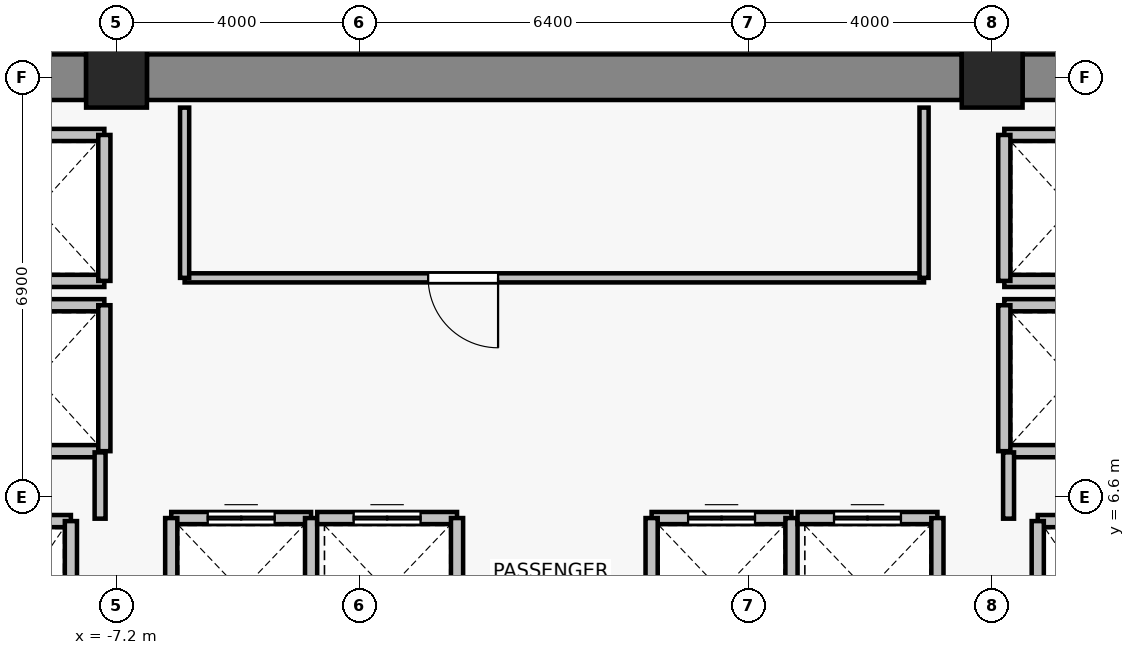
"""IFC4 building model, lengths in metres.
Left out: names, types, materials, properties, quantities, classifications, styles, units other than length and angle.
Written with IfcOpenShell. Run it as: python <this file> out.ifc"""

import sys

from ifc_helpers import new_model, si_unit, direction, frame, frame_2d, origin, origin_2d, place, context, subcontext, project, spatial, rectangle, extrude, source, transform, mapped, element, fill, save


model = new_model("IFC4")
c1 = context("Model", 3, precision=1e-05, world=origin(), true_north=direction((0.0, 1.0)))
c2 = subcontext(c1, "Body", "Model", "MODEL_VIEW")
j1 = project(units=[si_unit("LENGTHUNIT", "METRE"), si_unit("PLANEANGLEUNIT", "RADIAN")], contexts=[c1])
p1 = place(None, origin())
s1 = spatial("IfcSite", under=j1, at=p1, CompositionType="ELEMENT")
p2 = place(p1, origin())
s2 = spatial("IfcBuilding", under=s1, at=p2, CompositionType="ELEMENT")
p3 = place(p2, frame((0.0, 0.0, 182.5)))
s3 = spatial("IfcBuildingStorey", under=s2, at=p3, CompositionType="ELEMENT", Elevation=182.5)
for number, where, z_axis, x_axis in (
    (1, (-7.2, 13.5, 0.0), (0.0, 0.0, 1.0), (1.0, 0.0, 0.0)),
    (2, (7.2, 13.5, 0.0), (0.0, 0.0, 1.0), (1.0, 0.0, 0.0)),
):
    element("IfcColumn", number, at=place(p3, frame(where, z_axis=z_axis, x_axis=x_axis)), inside=s3, PredefinedType="COLUMN", context=c2, shape_type="SweptSolid", body=[
        extrude(rectangle(XDim=1.0, YDim=1.0, at=origin_2d()), origin(), (0.0, 0.0, 1.0), 3.3),
    ])
p4 = place(p3, frame((-13.9, 13.5, 0.0), z_axis=(0.0, 0.0, 1.0), x_axis=(1.0, 0.0, 0.0)))
e3 = element("IfcWall", 3, at=p4, inside=s3, PredefinedType="SHEAR", context=c2, shape_type="SweptSolid", body=[
    extrude(rectangle(XDim=6.2, YDim=0.75, at=frame_2d((3.1, 0.0))), origin(), (0.0, 0.0, 1.0), 3.075),
])
p5 = place(p3, frame((-6.7, 13.5, 0.0), z_axis=(0.0, 0.0, 1.0), x_axis=(1.0, 0.0, 0.0)))
e4 = element("IfcWall", 4, at=p5, inside=s3, PredefinedType="SHEAR", context=c2, shape_type="SweptSolid", body=[
    extrude(rectangle(XDim=13.4, YDim=0.75, at=frame_2d((6.7, 0.0))), origin(), (0.0, 0.0, 1.0), 3.075),
])
p6 = place(p3, frame((7.7, 13.5, 0.0), z_axis=(0.0, 0.0, 1.0), x_axis=(1.0, 0.0, 0.0)))
e5 = element("IfcWall", 5, at=p6, inside=s3, PredefinedType="SHEAR", context=c2, shape_type="SweptSolid", body=[
    extrude(rectangle(XDim=6.2, YDim=0.75, at=frame_2d((3.1, 0.0))), origin(), (0.0, 0.0, 1.0), 3.075),
])
p7 = place(p3, frame((-9.95, 6.2, 0.0), z_axis=(0.0, 0.0, 1.0), x_axis=(1.0, 0.0, 0.0)))
e6 = element("IfcWall", 6, at=p7, inside=s3, PredefinedType="SOLIDWALL", context=c2, shape_type="SweptSolid", body=[
    extrude(rectangle(XDim=2.0, YDim=0.2, at=frame_2d((1.0, 0.0))), origin(), (0.0, 0.0, 1.0), 3.075),
])
p8 = place(p3, frame((-7.95, 6.2, 0.0), z_axis=(0.0, 0.0, 1.0), x_axis=(0.0, -1.0, 0.0)))
e7 = element("IfcWall", 7, at=p8, inside=s3, PredefinedType="SOLIDWALL", context=c2, shape_type="SweptSolid", body=[
    extrude(rectangle(XDim=2.8, YDim=0.2, at=frame_2d((1.4, 0.0))), origin(), (0.0, 0.0, 1.0), 3.075),
])
p9 = place(p3, frame((7.95, 6.2, 0.0), z_axis=(0.0, 0.0, 1.0), x_axis=(1.0, 0.0, 0.0)))
e8 = element("IfcWall", 8, at=p9, inside=s3, PredefinedType="SOLIDWALL", context=c2, shape_type="SweptSolid", body=[
    extrude(rectangle(XDim=2.0, YDim=0.2, at=frame_2d((1.0, 0.0))), origin(), (0.0, 0.0, 1.0), 3.075),
])
p10 = place(p3, frame((7.95, 3.4, 0.0), z_axis=(0.0, 0.0, 1.0), x_axis=(0.0, 1.0, 0.0)))
e9 = element("IfcWall", 9, at=p10, inside=s3, PredefinedType="SOLIDWALL", context=c2, shape_type="SweptSolid", body=[
    extrude(rectangle(XDim=2.8, YDim=0.2, at=frame_2d((1.4, 0.0))), origin(), (0.0, 0.0, 1.0), 3.075),
])
p11 = place(p3, frame((-6.3, 6.25, 0.0), z_axis=(0.0, 0.0, 1.0), x_axis=(1.0, 0.0, 0.0)))
e10 = element("IfcWall", 10, at=p11, inside=s3, PredefinedType="SOLIDWALL", context=c2, shape_type="SweptSolid", body=[
    extrude(rectangle(XDim=2.3, YDim=0.2, at=frame_2d((1.15, 0.0))), origin(), (0.0, 0.0, 1.0), 3.075),
])
p12 = place(p11, frame((0.6, 0.0, 0.0)))
e11 = element("IfcOpeningElement", 11, at=p12, cuts=e10, PredefinedType="OPENING", context=c2, shape_type="SweptSolid", body=[
    extrude(rectangle(XDim=1.1, YDim=2.2, at=frame_2d((0.55, 1.1))), frame((0.0, 0.11, 0.0), z_axis=(0.0, -1.0, 0.0), x_axis=(1.0, 0.0, 0.0)), (0.0, 0.0, 1.0), 0.22),
])
for number, where, z_axis, x_axis in (
    (12, (-6.3, 3.85, 0.0), (0.0, 0.0, 1.0), (0.0, 1.0, 0.0)),
    (13, (-4.0, 6.25, 0.0), (0.0, 0.0, 1.0), (0.0, -1.0, 0.0)),
):
    element("IfcWall", number, at=place(p3, frame(where, z_axis=z_axis, x_axis=x_axis)), inside=s3, PredefinedType="SOLIDWALL", context=c2, shape_type="SweptSolid", body=[
        extrude(rectangle(XDim=2.4, YDim=0.2, at=frame_2d((1.2, 0.0))), origin(), (0.0, 0.0, 1.0), 3.075),
    ])
p13 = place(p3, frame((-3.9, 6.25, 0.0), z_axis=(0.0, 0.0, 1.0), x_axis=(1.0, 0.0, 0.0)))
e14 = element("IfcWall", 14, at=p13, inside=s3, PredefinedType="SOLIDWALL", context=c2, shape_type="SweptSolid", body=[
    extrude(rectangle(XDim=2.3, YDim=0.2, at=frame_2d((1.15, 0.0))), origin(), (0.0, 0.0, 1.0), 3.075),
])
p14 = place(p13, frame((0.6, 0.0, 0.0)))
e15 = element("IfcOpeningElement", 15, at=p14, cuts=e14, PredefinedType="OPENING", context=c2, shape_type="SweptSolid", body=[
    extrude(rectangle(XDim=1.1, YDim=2.2, at=frame_2d((0.55, 1.1))), frame((0.0, 0.11, 0.0), z_axis=(0.0, -1.0, 0.0), x_axis=(1.0, 0.0, 0.0)), (0.0, 0.0, 1.0), 0.22),
])
p15 = place(p3, frame((-1.6, 6.25, 0.0), z_axis=(0.0, 0.0, 1.0), x_axis=(0.0, -1.0, 0.0)))
e16 = element("IfcWall", 16, at=p15, inside=s3, PredefinedType="SOLIDWALL", context=c2, shape_type="SweptSolid", body=[
    extrude(rectangle(XDim=2.4, YDim=0.2, at=frame_2d((1.2, 0.0))), origin(), (0.0, 0.0, 1.0), 3.075),
])
p16 = place(p3, frame((1.6, 6.25, 0.0), z_axis=(0.0, 0.0, 1.0), x_axis=(1.0, 0.0, 0.0)))
e17 = element("IfcWall", 17, at=p16, inside=s3, PredefinedType="SOLIDWALL", context=c2, shape_type="SweptSolid", body=[
    extrude(rectangle(XDim=2.3, YDim=0.2, at=frame_2d((1.15, 0.0))), origin(), (0.0, 0.0, 1.0), 3.075),
])
p17 = place(p16, frame((0.6, 0.0, 0.0)))
e18 = element("IfcOpeningElement", 18, at=p17, cuts=e17, PredefinedType="OPENING", context=c2, shape_type="SweptSolid", body=[
    extrude(rectangle(XDim=1.1, YDim=2.2, at=frame_2d((0.55, 1.1))), frame((0.0, 0.11, 0.0), z_axis=(0.0, -1.0, 0.0), x_axis=(1.0, 0.0, 0.0)), (0.0, 0.0, 1.0), 0.22),
])
for number, where, z_axis, x_axis in (
    (19, (1.6, 3.85, 0.0), (0.0, 0.0, 1.0), (0.0, 1.0, 0.0)),
    (20, (3.9, 6.25, 0.0), (0.0, 0.0, 1.0), (0.0, -1.0, 0.0)),
):
    element("IfcWall", number, at=place(p3, frame(where, z_axis=z_axis, x_axis=x_axis)), inside=s3, PredefinedType="SOLIDWALL", context=c2, shape_type="SweptSolid", body=[
        extrude(rectangle(XDim=2.4, YDim=0.2, at=frame_2d((1.2, 0.0))), origin(), (0.0, 0.0, 1.0), 3.075),
    ])
p18 = place(p3, frame((4.0, 6.25, 0.0), z_axis=(0.0, 0.0, 1.0), x_axis=(1.0, 0.0, 0.0)))
e21 = element("IfcWall", 21, at=p18, inside=s3, PredefinedType="SOLIDWALL", context=c2, shape_type="SweptSolid", body=[
    extrude(rectangle(XDim=2.3, YDim=0.2, at=frame_2d((1.15, 0.0))), origin(), (0.0, 0.0, 1.0), 3.075),
])
p19 = place(p18, frame((0.6, 0.0, 0.0)))
e22 = element("IfcOpeningElement", 22, at=p19, cuts=e21, PredefinedType="OPENING", context=c2, shape_type="SweptSolid", body=[
    extrude(rectangle(XDim=1.1, YDim=2.2, at=frame_2d((0.55, 1.1))), frame((0.0, 0.11, 0.0), z_axis=(0.0, -1.0, 0.0), x_axis=(1.0, 0.0, 0.0)), (0.0, 0.0, 1.0), 0.22),
])
p20 = place(p3, frame((6.3, 6.25, 0.0), z_axis=(0.0, 0.0, 1.0), x_axis=(0.0, -1.0, 0.0)))
e23 = element("IfcWall", 23, at=p20, inside=s3, PredefinedType="SOLIDWALL", context=c2, shape_type="SweptSolid", body=[
    extrude(rectangle(XDim=2.4, YDim=0.2, at=frame_2d((1.2, 0.0))), origin(), (0.0, 0.0, 1.0), 3.075),
])
for number, where, z_axis, x_axis in (
    (24, (-7.4, 7.35, 0.0), (0.0, 0.0, 1.0), (-1.0, 0.0, 0.0)),
    (25, (-9.6, 9.75, 0.0), (0.0, 0.0, 1.0), (1.0, 0.0, 0.0)),
):
    element("IfcWall", number, at=place(p3, frame(where, z_axis=z_axis, x_axis=x_axis)), inside=s3, PredefinedType="SOLIDWALL", context=c2, shape_type="SweptSolid", body=[
        extrude(rectangle(XDim=2.2, YDim=0.2, at=frame_2d((1.1, 0.0))), origin(), (0.0, 0.0, 1.0), 2.565),
    ])
p21 = place(p3, frame((-7.4, 9.75, 0.0), z_axis=(0.0, 0.0, 1.0), x_axis=(0.0, -1.0, 0.0)))
e26 = element("IfcWall", 26, at=p21, inside=s3, PredefinedType="SOLIDWALL", context=c2, shape_type="SweptSolid", body=[
    extrude(rectangle(XDim=2.4, YDim=0.2, at=frame_2d((1.2, 0.0))), origin(), (0.0, 0.0, 1.0), 2.565),
])
for number, where, z_axis, x_axis in (
    (27, (-7.4, 10.15, 0.0), (0.0, 0.0, 1.0), (-1.0, 0.0, 0.0)),
    (28, (-9.6, 12.55, 0.0), (0.0, 0.0, 1.0), (1.0, 0.0, 0.0)),
):
    element("IfcWall", number, at=place(p3, frame(where, z_axis=z_axis, x_axis=x_axis)), inside=s3, PredefinedType="SOLIDWALL", context=c2, shape_type="SweptSolid", body=[
        extrude(rectangle(XDim=2.2, YDim=0.2, at=frame_2d((1.1, 0.0))), origin(), (0.0, 0.0, 1.0), 2.565),
    ])
p22 = place(p3, frame((-7.4, 12.55, 0.0), z_axis=(0.0, 0.0, 1.0), x_axis=(0.0, -1.0, 0.0)))
e29 = element("IfcWall", 29, at=p22, inside=s3, PredefinedType="SOLIDWALL", context=c2, shape_type="SweptSolid", body=[
    extrude(rectangle(XDim=2.4, YDim=0.2, at=frame_2d((1.2, 0.0))), origin(), (0.0, 0.0, 1.0), 2.565),
])
for number, where, z_axis, x_axis in (
    (30, (9.6, 7.35, 0.0), (0.0, 0.0, 1.0), (-1.0, 0.0, 0.0)),
    (31, (7.4, 9.75, 0.0), (0.0, 0.0, 1.0), (1.0, 0.0, 0.0)),
):
    element("IfcWall", number, at=place(p3, frame(where, z_axis=z_axis, x_axis=x_axis)), inside=s3, PredefinedType="SOLIDWALL", context=c2, shape_type="SweptSolid", body=[
        extrude(rectangle(XDim=2.2, YDim=0.2, at=frame_2d((1.1, 0.0))), origin(), (0.0, 0.0, 1.0), 2.565),
    ])
p23 = place(p3, frame((7.4, 7.35, 0.0), z_axis=(0.0, 0.0, 1.0), x_axis=(0.0, 1.0, 0.0)))
e32 = element("IfcWall", 32, at=p23, inside=s3, PredefinedType="SOLIDWALL", context=c2, shape_type="SweptSolid", body=[
    extrude(rectangle(XDim=2.4, YDim=0.2, at=frame_2d((1.2, 0.0))), origin(), (0.0, 0.0, 1.0), 2.565),
])
for number, where, z_axis, x_axis in (
    (33, (9.6, 10.15, 0.0), (0.0, 0.0, 1.0), (-1.0, 0.0, 0.0)),
    (34, (7.4, 12.55, 0.0), (0.0, 0.0, 1.0), (1.0, 0.0, 0.0)),
):
    element("IfcWall", number, at=place(p3, frame(where, z_axis=z_axis, x_axis=x_axis)), inside=s3, PredefinedType="SOLIDWALL", context=c2, shape_type="SweptSolid", body=[
        extrude(rectangle(XDim=2.2, YDim=0.2, at=frame_2d((1.1, 0.0))), origin(), (0.0, 0.0, 1.0), 2.565),
    ])
p24 = place(p3, frame((7.4, 10.15, 0.0), z_axis=(0.0, 0.0, 1.0), x_axis=(0.0, 1.0, 0.0)))
e35 = element("IfcWall", 35, at=p24, inside=s3, PredefinedType="SOLIDWALL", context=c2, shape_type="SweptSolid", body=[
    extrude(rectangle(XDim=2.4, YDim=0.2, at=frame_2d((1.2, 0.0))), origin(), (0.0, 0.0, 1.0), 2.565),
])
for number, where, z_axis, x_axis in (
    (36, (-7.47, 7.33, 0.0), (0.0, 0.0, 1.0), (0.0, -1.0, 0.0)),
    (37, (7.47, 6.24, 0.0), (0.0, 0.0, 1.0), (0.0, 1.0, 0.0)),
):
    element("IfcWall", number, at=place(p3, frame(where, z_axis=z_axis, x_axis=x_axis)), inside=s3, PredefinedType="PARTITIONING", context=c2, shape_type="SweptSolid", body=[
        extrude(rectangle(XDim=1.09, YDim=0.18, at=frame_2d((0.545, 0.0))), origin(), (0.0, 0.0, 1.0), 2.565),
    ])
p25 = place(p3, frame((6.08, 10.2, 0.0), z_axis=(0.0, 0.0, 1.0), x_axis=(-1.0, 0.0, 0.0)))
e38 = element("IfcWall", 38, at=p25, inside=s3, PredefinedType="PARTITIONING", context=c2, shape_type="SweptSolid", body=[
    extrude(rectangle(XDim=12.16, YDim=0.15, at=frame_2d((6.08, 0.0))), origin(), (0.0, 0.0, 1.0), 3.075),
])
p26 = place(p25, frame((7.005, 0.0, 0.0)))
e39 = element("IfcOpeningElement", 39, at=p26, cuts=e38, PredefinedType="OPENING", context=c2, shape_type="SweptSolid", body=[
    extrude(rectangle(XDim=1.15, YDim=2.15, at=frame_2d((0.575, 1.075))), frame((0.0, 0.085, 0.0), z_axis=(0.0, -1.0, 0.0), x_axis=(1.0, 0.0, 0.0)), (0.0, 0.0, 1.0), 0.17),
])
for number, where, z_axis, x_axis in (
    (40, (-6.08, 10.2, 0.0), (0.0, 0.0, 1.0), (0.0, 1.0, 0.0)),
    (41, (6.08, 13.0, 0.0), (0.0, 0.0, 1.0), (0.0, -1.0, 0.0)),
):
    element("IfcWall", number, at=place(p3, frame(where, z_axis=z_axis, x_axis=x_axis)), inside=s3, PredefinedType="PARTITIONING", context=c2, shape_type="SweptSolid", body=[
        extrude(rectangle(XDim=2.8, YDim=0.15, at=frame_2d((1.4, 0.0))), origin(), (0.0, 0.0, 1.0), 3.075),
    ])
m1 = source(origin(), c2, "Body", "SweptSolid", [
    extrude(rectangle(XDim=1.1, YDim=2.2, at=frame_2d((0.55, 1.1))), frame((0.0, 0.025, 0.0), z_axis=(0.0, -1.0, 0.0), x_axis=(1.0, 0.0, 0.0)), (0.0, 0.0, 1.0), 0.05),
])
p27 = place(p12, origin())
e42 = element("IfcDoor", 42, at=p27, inside=s3, OperationType="DOUBLE_DOOR_SLIDING", PredefinedType="DOOR", context=c2, shape_type="MappedRepresentation", body=[
    mapped(m1, transform((0.0, 0.0, 0.0), x_axis=(1.0, 0.0, 0.0), y_axis=(0.0, 1.0, 0.0), z_axis=(0.0, 0.0, 1.0), scale=1.0)),
])
fill(e11, e42)
p28 = place(p14, origin())
e43 = element("IfcDoor", 43, at=p28, inside=s3, OperationType="DOUBLE_DOOR_SLIDING", PredefinedType="DOOR", context=c2, shape_type="MappedRepresentation", body=[
    mapped(m1, transform((0.0, 0.0, 0.0), x_axis=(1.0, 0.0, 0.0), y_axis=(0.0, 1.0, 0.0), z_axis=(0.0, 0.0, 1.0), scale=1.0)),
])
fill(e15, e43)
p29 = place(p17, origin())
e44 = element("IfcDoor", 44, at=p29, inside=s3, OperationType="DOUBLE_DOOR_SLIDING", PredefinedType="DOOR", context=c2, shape_type="MappedRepresentation", body=[
    mapped(m1, transform((0.0, 0.0, 0.0), x_axis=(1.0, 0.0, 0.0), y_axis=(0.0, 1.0, 0.0), z_axis=(0.0, 0.0, 1.0), scale=1.0)),
])
fill(e18, e44)
p30 = place(p19, origin())
e45 = element("IfcDoor", 45, at=p30, inside=s3, OperationType="DOUBLE_DOOR_SLIDING", PredefinedType="DOOR", context=c2, shape_type="MappedRepresentation", body=[
    mapped(m1, transform((0.0, 0.0, 0.0), x_axis=(1.0, 0.0, 0.0), y_axis=(0.0, 1.0, 0.0), z_axis=(0.0, 0.0, 1.0), scale=1.0)),
])
fill(e22, e45)
m2 = source(origin(), c2, "Body", "SweptSolid", [
    extrude(rectangle(XDim=1.15, YDim=2.15, at=frame_2d((0.575, 1.075))), frame((0.0, 0.025, 0.0), z_axis=(0.0, -1.0, 0.0), x_axis=(1.0, 0.0, 0.0)), (0.0, 0.0, 1.0), 0.05),
])
p31 = place(p26, origin())
e46 = element("IfcDoor", 46, at=p31, inside=s3, OperationType="SINGLE_SWING_LEFT", PredefinedType="DOOR", context=c2, shape_type="MappedRepresentation", body=[
    mapped(m2, transform((0.0, 0.0, 0.0), x_axis=(1.0, 0.0, 0.0), y_axis=(0.0, 1.0, 0.0), z_axis=(0.0, 0.0, 1.0), scale=1.0)),
])
fill(e39, e46)
save(model, sys.argv[1])
